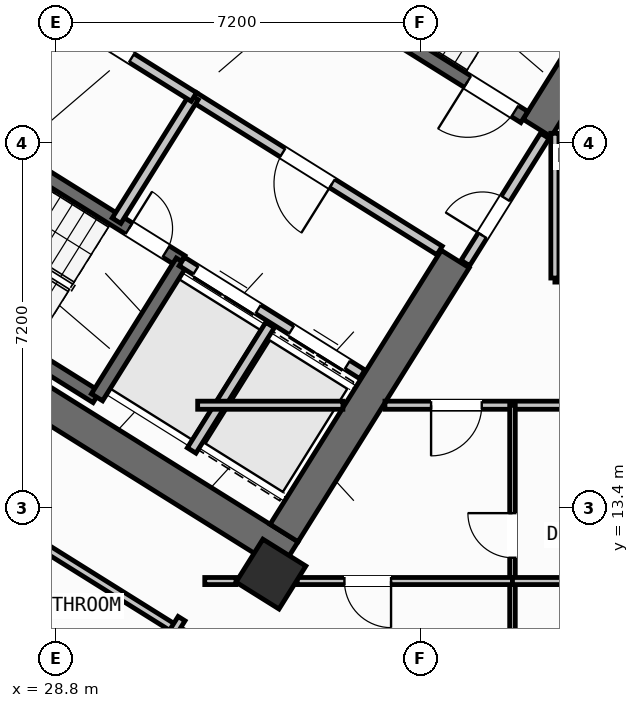
"""IFC4 building model, lengths in metres.
Left out: names, types, materials, properties, quantities, classifications, styles, units other than length and angle.
Written with IfcOpenShell. Run it as: python <this file> out.ifc"""

import sys

from ifc_helpers import new_model, si_unit, direction, frame, frame_2d, origin, origin_2d, place, context, subcontext, project, spatial, rectangle, hollow_rectangle, extrude, source, transform, mapped, element, fill, save


model = new_model("IFC4")
c1 = context("Model", 3, precision=1e-05, world=origin(), true_north=direction((0.0, 1.0)))
c2 = subcontext(c1, "Body", "Model", "MODEL_VIEW")
j1 = project(units=[si_unit("LENGTHUNIT", "METRE"), si_unit("PLANEANGLEUNIT", "RADIAN")], contexts=[c1])
p1 = place(None, origin())
s1 = spatial("IfcSite", under=j1, at=p1, CompositionType="ELEMENT")
p2 = place(p1, origin())
s2 = spatial("IfcBuilding", under=s1, at=p2, CompositionType="ELEMENT")
p3 = place(p2, frame((0.0, 0.0, 60.0)))
s3 = spatial("IfcBuildingStorey", under=s2, at=p3, CompositionType="ELEMENT", Elevation=60.0)
p4 = place(p3, frame((33.409, 12.45, 0.0), z_axis=(0.0, 0.0, 1.0), x_axis=(-0.848051132073, 0.529914405721, 0.0)))
e1 = element("IfcWall", 1, at=p4, inside=s3, PredefinedType="SHEAR", context=c2, shape_type="SweptSolid", body=[
    extrude(rectangle(XDim=13.24, YDim=0.65, at=frame_2d((6.62, 0.0))), origin(), (0.0, 0.0, 1.0), 3.35),
])
p5 = place(p3, frame((40.168, 23.88, 0.0), z_axis=(0.0, 0.0, 1.0), x_axis=(-0.529893103397, -0.8480644427, 0.0)))
e2 = element("IfcWall", 2, at=p5, inside=s3, PredefinedType="SHEAR", context=c2, shape_type="SweptSolid", body=[
    extrude(rectangle(XDim=3.525, YDim=0.65, at=frame_2d((1.763, 0.0))), origin(), (0.0, 0.0, 1.0), 3.35),
])
p6 = place(p3, frame((36.683, 18.304, 0.0), z_axis=(0.0, 0.0, 1.0), x_axis=(-0.529899109053, -0.848060690178, 0.0)))
e3 = element("IfcWall", 3, at=p6, inside=s3, PredefinedType="SHEAR", context=c2, shape_type="SweptSolid", body=[
    extrude(rectangle(XDim=6.375, YDim=0.65, at=frame_2d((3.188, 0.0))), origin(), (0.0, 0.0, 1.0), 3.35),
])
m1 = source(origin(), c2, "Body", "SweptSolid", [
    extrude(hollow_rectangle(XDim=1.0, YDim=1.0, WallThickness=0.04, at=origin_2d()), origin(), (0.0, 0.0, 1.0), 3.6),
])
p7 = place(p3, frame((33.046, 12.087, 0.0), z_axis=(0.0, 0.0, 1.0), x_axis=(-0.848048096156, 0.529919264233, 0.0)))
e4 = element("IfcColumn", 4, at=p7, inside=s3, PredefinedType="COLUMN", context=c2, shape_type="MappedRepresentation", body=[
    mapped(m1, transform((0.0, 0.0, 0.0), scale=1.0)),
])
p8 = place(p3, frame((29.268, 6.429, 0.0), z_axis=(0.0, 0.0, 1.0), x_axis=(-0.848049971435, 0.529916263149, 0.0)))
e5 = element("IfcWall", 5, at=p8, inside=s3, PredefinedType="STANDARD", context=c2, shape_type="SweptSolid", body=[
    extrude(rectangle(XDim=31.588, YDim=0.32, at=frame_2d((15.794, 0.0))), origin(), (0.0, 0.0, 1.0), 3.35),
])
p9 = place(p8, frame((16.235, 0.0, 0.0)))
e6 = element("IfcOpeningElement", 6, at=p9, cuts=e5, PredefinedType="OPENING", context=c2, shape_type="SweptSolid", body=[
    extrude(rectangle(XDim=1.2, YDim=2.15, at=frame_2d((0.6, 1.075))), frame((0.0, 0.17, 0.0), z_axis=(0.0, -1.0, 0.0), x_axis=(1.0, 0.0, 0.0)), (0.0, 0.0, 1.0), 0.34),
])
p10 = place(p8, frame((2.989, 0.0, 0.8)))
e7 = element("IfcOpeningElement", 7, at=p10, cuts=e5, PredefinedType="OPENING", context=c2, shape_type="SweptSolid", body=[
    extrude(rectangle(XDim=2.1, YDim=1.55, at=frame_2d((1.05, 0.775))), frame((0.0, 0.17, 0.0), z_axis=(0.0, -1.0, 0.0), x_axis=(1.0, 0.0, 0.0)), (0.0, 0.0, 1.0), 0.34),
])
p11 = place(p8, frame((8.359, 0.0, 0.8)))
e8 = element("IfcOpeningElement", 8, at=p11, cuts=e5, PredefinedType="OPENING", context=c2, shape_type="SweptSolid", body=[
    extrude(rectangle(XDim=2.1, YDim=1.55, at=frame_2d((1.05, 0.775))), frame((0.0, 0.17, 0.0), z_axis=(0.0, -1.0, 0.0), x_axis=(1.0, 0.0, 0.0)), (0.0, 0.0, 1.0), 0.34),
])
p12 = place(p8, frame((13.284, 0.0, 0.95)))
e9 = element("IfcOpeningElement", 9, at=p12, cuts=e5, PredefinedType="OPENING", context=c2, shape_type="SweptSolid", body=[
    extrude(rectangle(XDim=1.2, YDim=1.4, at=frame_2d((0.6, 0.7))), frame((0.0, 0.17, 0.0), z_axis=(0.0, -1.0, 0.0), x_axis=(1.0, 0.0, 0.0)), (0.0, 0.0, 1.0), 0.34),
])
p13 = place(p8, frame((22.374, 0.0, 0.95)))
e10 = element("IfcOpeningElement", 10, at=p13, cuts=e5, PredefinedType="OPENING", context=c2, shape_type="SweptSolid", body=[
    extrude(rectangle(XDim=1.2, YDim=1.4, at=frame_2d((0.6, 0.7))), frame((0.0, 0.17, 0.0), z_axis=(0.0, -1.0, 0.0), x_axis=(1.0, 0.0, 0.0)), (0.0, 0.0, 1.0), 0.34),
])
p14 = place(p8, frame((26.351, 0.0, 1.0)))
e11 = element("IfcOpeningElement", 11, at=p14, cuts=e5, PredefinedType="OPENING", context=c2, shape_type="SweptSolid", body=[
    extrude(rectangle(XDim=0.9, YDim=1.25, at=frame_2d((0.45, 0.625))), frame((0.0, 0.17, 0.0), z_axis=(0.0, -1.0, 0.0), x_axis=(1.0, 0.0, 0.0)), (0.0, 0.0, 1.0), 0.34),
])
p15 = place(p8, frame((29.052, 0.0, 0.85)))
e12 = element("IfcOpeningElement", 12, at=p15, cuts=e5, PredefinedType="OPENING", context=c2, shape_type="SweptSolid", body=[
    extrude(rectangle(XDim=1.8, YDim=1.5, at=frame_2d((0.9, 0.75))), frame((0.0, 0.17, 0.0), z_axis=(0.0, -1.0, 0.0), x_axis=(1.0, 0.0, 0.0)), (0.0, 0.0, 1.0), 0.34),
])
p16 = place(p3, frame((29.605, 15.581, 0.0), z_axis=(0.0, 0.0, 1.0), x_axis=(-0.848036911448, 0.529937163087, 0.0)))
e13 = element("IfcWall", 13, at=p16, inside=s3, PredefinedType="SHEAR", context=c2, shape_type="SweptSolid", body=[
    extrude(rectangle(XDim=7.46, YDim=0.26, at=frame_2d((3.73, 0.0))), origin(), (0.0, 0.0, 1.0), 3.35),
])
p17 = place(p3, frame((31.28, 18.261, 0.0), z_axis=(0.0, 0.0, 1.0), x_axis=(-0.848051618787, 0.529913626805, 0.0)))
e14 = element("IfcWall", 14, at=p17, inside=s3, PredefinedType="SHEAR", context=c2, shape_type="SweptSolid", body=[
    extrude(rectangle(XDim=7.46, YDim=0.26, at=frame_2d((3.73, 0.0))), origin(), (0.0, 0.0, 1.0), 3.35),
])
p18 = place(p17, frame((0.36, 0.0, 0.0)))
e15 = element("IfcOpeningElement", 15, at=p18, cuts=e14, PredefinedType="OPENING", context=c2, shape_type="SweptSolid", body=[
    extrude(rectangle(XDim=0.86, YDim=2.05, at=frame_2d((0.43, 1.025))), frame((0.0, 0.14, 0.0), z_axis=(0.0, -1.0, 0.0), x_axis=(1.0, 0.0, 0.0)), (0.0, 0.0, 1.0), 0.28),
])
p19 = place(p3, frame((31.288, 18.256, 0.0), z_axis=(0.0, 0.0, 1.0), x_axis=(-0.529943379326, -0.848033026897, 0.0)))
e16 = element("IfcWall", 16, at=p19, inside=s3, PredefinedType="SHEAR", context=c2, shape_type="SweptSolid", body=[
    extrude(rectangle(XDim=3.16, YDim=0.26, at=frame_2d((1.58, 0.0))), origin(), (0.0, 0.0, 1.0), 3.35),
])
p20 = place(p3, frame((38.046, 21.108, 0.0), z_axis=(0.0, 0.0, 1.0), x_axis=(-0.848054434086, 0.529909121291, 0.0)))
e17 = element("IfcWall", 17, at=p20, inside=s3, PredefinedType="SHEAR", context=c2, shape_type="SweptSolid", body=[
    extrude(rectangle(XDim=7.33, YDim=0.26, at=frame_2d((3.665, 0.0))), origin(), (0.0, 0.0, 1.0), 3.35),
])
p21 = place(p20, frame((0.22, 0.0, 0.0)))
e18 = element("IfcOpeningElement", 18, at=p21, cuts=e17, PredefinedType="OPENING", context=c2, shape_type="SweptSolid", body=[
    extrude(rectangle(XDim=1.1, YDim=2.1, at=frame_2d((0.55, 1.05))), frame((0.0, 0.14, 0.0), z_axis=(0.0, -1.0, 0.0), x_axis=(1.0, 0.0, 0.0)), (0.0, 0.0, 1.0), 0.28),
])
p22 = place(p3, frame((34.848, 16.031, 0.0), z_axis=(0.0, 0.0, 1.0), x_axis=(-0.848044042236, 0.529925751807, 0.0)))
e19 = element("IfcWall", 19, at=p22, inside=s3, PredefinedType="STANDARD", context=c2, shape_type="SweptSolid", body=[
    extrude(rectangle(XDim=4.198, YDim=0.2, at=frame_2d((2.099, 0.0))), origin(), (0.0, 0.0, 1.0), 3.34),
])
p23 = place(p22, frame((0.348, 0.0, 0.0)))
e20 = element("IfcOpeningElement", 20, at=p23, cuts=e19, PredefinedType="OPENING", context=c2, shape_type="SweptSolid", body=[
    extrude(rectangle(XDim=1.3, YDim=2.2, at=frame_2d((0.65, 1.1))), frame((0.0, 0.11, 0.0), z_axis=(0.0, -1.0, 0.0), x_axis=(1.0, 0.0, 0.0)), (0.0, 0.0, 1.0), 0.22),
])
p24 = place(p22, frame((2.423, 0.0, 0.0)))
e21 = element("IfcOpeningElement", 21, at=p24, cuts=e19, PredefinedType="OPENING", context=c2, shape_type="SweptSolid", body=[
    extrude(rectangle(XDim=1.45, YDim=2.25, at=frame_2d((0.725, 1.125))), frame((0.0, 0.11, 0.0), z_axis=(0.0, -1.0, 0.0), x_axis=(1.0, 0.0, 0.0)), (0.0, 0.0, 1.0), 0.22),
])
p25 = place(p3, frame((36.374, 18.474, 0.0), z_axis=(0.0, 0.0, 1.0), x_axis=(-0.848051071577, 0.529914502535, 0.0)))
e22 = element("IfcWall", 22, at=p25, inside=s3, PredefinedType="STANDARD", context=c2, shape_type="SweptSolid", body=[
    extrude(rectangle(XDim=5.718, YDim=0.2, at=frame_2d((2.859, 0.0))), origin(), (0.0, 0.0, 1.0), 3.34),
])
p26 = place(p25, frame((2.498, 0.0, 0.0)))
e23 = element("IfcOpeningElement", 23, at=p26, cuts=e22, PredefinedType="OPENING", context=c2, shape_type="SweptSolid", body=[
    extrude(rectangle(XDim=1.15, YDim=2.1, at=frame_2d((0.575, 1.05))), frame((0.0, 0.11, 0.0), z_axis=(0.0, -1.0, 0.0), x_axis=(1.0, 0.0, 0.0)), (0.0, 0.0, 1.0), 0.22),
])
p27 = place(p3, frame((33.029, 17.003, 0.0), z_axis=(0.0, 0.0, 1.0), x_axis=(-0.529916267533, -0.848049968695, 0.0)))
e24 = element("IfcWall", 24, at=p27, inside=s3, PredefinedType="STANDARD", context=c2, shape_type="SweptSolid", body=[
    extrude(rectangle(XDim=2.92, YDim=0.2, at=frame_2d((1.46, 0.0))), origin(), (0.0, 0.0, 1.0), 3.34),
])
for number, where, z_axis, x_axis in (
    (25, (31.525, 21.504, 0.0), (0.0, 0.0, 1.0), (-0.53, -0.848, 0.0)),
    (26, (28.71, 23.263, 0.0), (0.0, 0.0, 1.0), (-0.53, -0.848, 0.0)),
):
    element("IfcWall", number, at=place(p3, frame(where, z_axis=z_axis, x_axis=x_axis)), inside=s3, PredefinedType="STANDARD", context=c2, shape_type="SweptSolid", body=[
        extrude(rectangle(XDim=2.88, YDim=0.2, at=frame_2d((1.44, 0.0))), origin(), (0.0, 0.0, 1.0), 3.34),
    ])
p28 = place(p3, frame((31.525, 21.504, 0.0), z_axis=(0.0, 0.0, 1.0), x_axis=(-0.848044998614, 0.529924221305, 0.0)))
e27 = element("IfcWall", 27, at=p28, inside=s3, PredefinedType="STANDARD", context=c2, shape_type="SweptSolid", body=[
    extrude(rectangle(XDim=6.168, YDim=0.2, at=frame_2d((3.084, 0.0))), origin(), (0.0, 0.0, 1.0), 3.34),
])
p29 = place(p28, frame((4.4, 0.0, 0.0)))
e28 = element("IfcOpeningElement", 28, at=p29, cuts=e27, PredefinedType="OPENING", context=c2, shape_type="SweptSolid", body=[
    extrude(rectangle(XDim=0.86, YDim=2.05, at=frame_2d((0.43, 1.025))), frame((0.0, 0.11, 0.0), z_axis=(0.0, -1.0, 0.0), x_axis=(1.0, 0.0, 0.0)), (0.0, 0.0, 1.0), 0.22),
])
p30 = place(p28, frame((1.45, 0.0, 0.0)))
e29 = element("IfcOpeningElement", 29, at=p30, cuts=e27, PredefinedType="OPENING", context=c2, shape_type="SweptSolid", body=[
    extrude(rectangle(XDim=0.86, YDim=2.05, at=frame_2d((0.43, 1.025))), frame((0.0, 0.11, 0.0), z_axis=(0.0, -1.0, 0.0), x_axis=(1.0, 0.0, 0.0)), (0.0, 0.0, 1.0), 0.22),
])
p31 = place(p3, frame((32.164, 10.374, 0.0), z_axis=(0.0, 0.0, 1.0), x_axis=(-0.848044107957, 0.529925646633, 0.0)))
e30 = element("IfcWall", 30, at=p31, inside=s3, PredefinedType="PARTITIONING", context=c2, shape_type="SweptSolid", body=[
    extrude(rectangle(XDim=15.57, YDim=0.16, at=frame_2d((7.785, 0.0))), origin(), (0.0, 0.0, 1.0), 3.34),
])
p32 = place(p31, frame((10.83, 0.0, 0.0)))
e31 = element("IfcOpeningElement", 31, at=p32, cuts=e30, PredefinedType="OPENING", context=c2, shape_type="SweptSolid", body=[
    extrude(rectangle(XDim=1.0, YDim=2.1, at=frame_2d((0.5, 1.05))), frame((0.0, 0.09, 0.0), z_axis=(0.0, -1.0, 0.0), x_axis=(1.0, 0.0, 0.0)), (0.0, 0.0, 1.0), 0.18),
])
p33 = place(p3, frame((31.282, 11.208, 0.0), z_axis=(0.0, 0.0, 1.0), x_axis=(-0.529938869374, -0.84803584519, 0.0)))
e32 = element("IfcWall", 32, at=p33, inside=s3, PredefinedType="PARTITIONING", context=c2, shape_type="SweptSolid", body=[
    extrude(rectangle(XDim=5.48, YDim=0.16, at=frame_2d((2.74, 0.0))), origin(), (0.0, 0.0, 1.0), 3.34),
])
p34 = place(p3, frame((29.72, 8.859, 0.0), z_axis=(0.0, 0.0, 1.0), x_axis=(-0.848049134363, 0.529917602752, 0.0)))
e33 = element("IfcWall", 33, at=p34, inside=s3, PredefinedType="PLUMBINGWALL", context=c2, shape_type="SweptSolid", body=[
    extrude(rectangle(XDim=14.3, YDim=0.14, at=frame_2d((7.15, 0.0))), origin(), (0.0, 0.0, 1.0), 3.34),
])
p35 = place(p34, frame((9.57, 0.0, 0.0)))
e34 = element("IfcOpeningElement", 34, at=p35, cuts=e33, PredefinedType="OPENING", context=c2, shape_type="SweptSolid", body=[
    extrude(rectangle(XDim=0.92, YDim=2.08, at=frame_2d((0.46, 1.04))), frame((0.0, 0.08, 0.0), z_axis=(0.0, -1.0, 0.0), x_axis=(1.0, 0.0, 0.0)), (0.0, 0.0, 1.0), 0.16),
])
p36 = place(p3, frame((38.451, 20.737, 0.0), z_axis=(0.0, 0.0, 1.0), x_axis=(-0.529924799939, -0.848044637038, 0.0)))
e35 = element("IfcWall", 35, at=p36, inside=s3, PredefinedType="STANDARD", context=c2, shape_type="SweptSolid", body=[
    extrude(rectangle(XDim=2.96, YDim=0.2, at=frame_2d((1.48, 0.0))), origin(), (0.0, 0.0, 1.0), 3.34),
])
p37 = place(p36, frame((1.46, 0.0, 0.0)))
e36 = element("IfcOpeningElement", 36, at=p37, cuts=e35, PredefinedType="OPENING", context=c2, shape_type="SweptSolid", body=[
    extrude(rectangle(XDim=0.86, YDim=2.05, at=frame_2d((0.43, 1.025))), frame((0.0, 0.11, 0.0), z_axis=(0.0, -1.0, 0.0), x_axis=(1.0, 0.0, 0.0)), (0.0, 0.0, 1.0), 0.22),
])
p38 = place(p3, frame((31.6, 15.42, 0.0), z_axis=(0.0, 0.0, 1.0), x_axis=(1.0, 0.0, 0.0)))
e37 = element("IfcWall", 37, at=p38, inside=s3, PredefinedType="PARTITIONING", context=c2, shape_type="SweptSolid", body=[
    extrude(rectangle(XDim=2.866, YDim=0.16, at=frame_2d((1.433, 0.0))), origin(), (0.0, 0.0, 1.0), 3.34),
])
p39 = place(p3, frame((35.296, 15.42, 0.0), z_axis=(0.0, 0.0, 1.0), x_axis=(1.0, 0.0, 0.0)))
e38 = element("IfcWall", 38, at=p39, inside=s3, PredefinedType="PARTITIONING", context=c2, shape_type="SweptSolid", body=[
    extrude(rectangle(XDim=15.311, YDim=0.16, at=frame_2d((7.655, 0.0))), origin(), (0.0, 0.0, 1.0), 3.34),
])
p40 = place(p39, frame((0.91, 0.0, 0.0)))
e39 = element("IfcOpeningElement", 39, at=p40, cuts=e38, PredefinedType="OPENING", context=c2, shape_type="SweptSolid", body=[
    extrude(rectangle(XDim=1.0, YDim=2.1, at=frame_2d((0.5, 1.05))), frame((0.0, 0.09, 0.0), z_axis=(0.0, -1.0, 0.0), x_axis=(1.0, 0.0, 0.0)), (0.0, 0.0, 1.0), 0.18),
])
p41 = place(p39, frame((8.74, 0.0, 0.0)))
e40 = element("IfcOpeningElement", 40, at=p41, cuts=e38, PredefinedType="OPENING", context=c2, shape_type="SweptSolid", body=[
    extrude(rectangle(XDim=1.0, YDim=2.1, at=frame_2d((0.5, 1.05))), frame((0.0, 0.09, 0.0), z_axis=(0.0, -1.0, 0.0), x_axis=(1.0, 0.0, 0.0)), (0.0, 0.0, 1.0), 0.18),
])
p42 = place(p3, frame((38.65, 17.93, 0.0), z_axis=(0.0, 0.0, 1.0), x_axis=(1.0, 0.0, 0.0)))
e41 = element("IfcWall", 41, at=p42, inside=s3, PredefinedType="PARTITIONING", context=c2, shape_type="SweptSolid", body=[
    extrude(rectangle(XDim=9.95, YDim=0.16, at=frame_2d((4.975, 0.0))), origin(), (0.0, 0.0, 1.0), 3.34),
])
p43 = place(p42, frame((4.475, 0.0, 0.0)))
e42 = element("IfcOpeningElement", 42, at=p43, cuts=e41, PredefinedType="OPENING", context=c2, shape_type="SweptSolid", body=[
    extrude(rectangle(XDim=1.0, YDim=2.1, at=frame_2d((0.5, 1.05))), frame((0.0, 0.09, 0.0), z_axis=(0.0, -1.0, 0.0), x_axis=(1.0, 0.0, 0.0)), (0.0, 0.0, 1.0), 0.18),
])
p44 = place(p3, frame((38.65, 17.93, 0.0), z_axis=(0.0, 0.0, 1.0), x_axis=(0.0, 1.0, 0.0)))
e43 = element("IfcWall", 43, at=p44, inside=s3, PredefinedType="PARTITIONING", context=c2, shape_type="SweptSolid", body=[
    extrude(rectangle(XDim=2.857, YDim=0.16, at=frame_2d((1.428, 0.0))), origin(), (0.0, 0.0, 1.0), 3.34),
])
p45 = place(p3, frame((37.813, 1.96, 0.0), z_axis=(0.0, 0.0, 1.0), x_axis=(0.0, 1.0, 0.0)))
e44 = element("IfcWall", 44, at=p45, inside=s3, PredefinedType="PARTITIONING", context=c2, shape_type="SweptSolid", body=[
    extrude(rectangle(XDim=13.46, YDim=0.11, at=frame_2d((6.73, 0.0))), origin(), (0.0, 0.0, 1.0), 3.34),
])
p46 = place(p45, frame((5.5, 0.0, 0.0)))
e45 = element("IfcOpeningElement", 45, at=p46, cuts=e44, PredefinedType="OPENING", context=c2, shape_type="SweptSolid", body=[
    extrude(rectangle(XDim=0.92, YDim=2.08, at=frame_2d((0.46, 1.04))), frame((0.0, 0.065, 0.0), z_axis=(0.0, -1.0, 0.0), x_axis=(1.0, 0.0, 0.0)), (0.0, 0.0, 1.0), 0.13),
])
p47 = place(p45, frame((10.45, 0.0, 0.0)))
e46 = element("IfcOpeningElement", 46, at=p47, cuts=e44, PredefinedType="OPENING", context=c2, shape_type="SweptSolid", body=[
    extrude(rectangle(XDim=0.88, YDim=2.08, at=frame_2d((0.44, 1.04))), frame((0.0, 0.065, 0.0), z_axis=(0.0, -1.0, 0.0), x_axis=(1.0, 0.0, 0.0)), (0.0, 0.0, 1.0), 0.13),
])
p48 = place(p3, frame((31.74, 11.95, 0.0), z_axis=(0.0, 0.0, 1.0), x_axis=(1.0, 0.0, 0.0)))
e47 = element("IfcWall", 47, at=p48, inside=s3, PredefinedType="PLUMBINGWALL", context=c2, shape_type="SweptSolid", body=[
    extrude(rectangle(XDim=0.617, YDim=0.14, at=frame_2d((0.309, 0.0))), origin(), (0.0, 0.0, 1.0), 3.34),
])
p49 = place(p3, frame((33.564, 11.95, 0.0), z_axis=(0.0, 0.0, 1.0), x_axis=(1.0, 0.0, 0.0)))
e48 = element("IfcWall", 48, at=p49, inside=s3, PredefinedType="PLUMBINGWALL", context=c2, shape_type="SweptSolid", body=[
    extrude(rectangle(XDim=4.249, YDim=0.14, at=frame_2d((2.124, 0.0))), origin(), (0.0, 0.0, 1.0), 2.525),
])
p50 = place(p49, frame((0.932, 0.0, 0.0)))
e49 = element("IfcOpeningElement", 49, at=p50, cuts=e48, PredefinedType="OPENING", context=c2, shape_type="SweptSolid", body=[
    extrude(rectangle(XDim=0.92, YDim=2.08, at=frame_2d((0.46, 1.04))), frame((0.0, 0.08, 0.0), z_axis=(0.0, -1.0, 0.0), x_axis=(1.0, 0.0, 0.0)), (0.0, 0.0, 1.0), 0.16),
])
p51 = place(p3, frame((37.813, 11.95, 0.0), z_axis=(0.0, 0.0, 1.0), x_axis=(1.0, 0.0, 0.0)))
e50 = element("IfcWall", 50, at=p51, inside=s3, PredefinedType="PLUMBINGWALL", context=c2, shape_type="SweptSolid", body=[
    extrude(rectangle(XDim=4.137, YDim=0.14, at=frame_2d((2.068, 0.0))), origin(), (0.0, 0.0, 1.0), 2.525),
])
m2 = source(origin(), c2, "Body", "SweptSolid", [
    extrude(rectangle(XDim=0.86, YDim=2.05, at=frame_2d((0.43, 1.025))), frame((0.0, 0.025, 0.0), z_axis=(0.0, -1.0, 0.0), x_axis=(1.0, 0.0, 0.0)), (0.0, 0.0, 1.0), 0.05),
])
p52 = place(p18, frame((0.86, 0.0, 0.0), z_axis=(0.0, 0.0, 1.0), x_axis=(-1.0, 0.0, 0.0)))
e51 = element("IfcDoor", 51, at=p52, inside=s3, OperationType="SINGLE_SWING_LEFT", PredefinedType="DOOR", context=c2, shape_type="MappedRepresentation", body=[
    mapped(m2, transform((0.0, 0.0, 0.0), scale=1.0)),
])
fill(e15, e51)
m3 = source(origin(), c2, "Body", "SweptSolid", [
    extrude(rectangle(XDim=1.1, YDim=2.1, at=frame_2d((0.55, 1.05))), frame((0.0, 0.025, 0.0), z_axis=(0.0, -1.0, 0.0), x_axis=(1.0, 0.0, 0.0)), (0.0, 0.0, 1.0), 0.05),
])
p53 = place(p21, origin())
e52 = element("IfcDoor", 52, at=p53, inside=s3, OperationType="SINGLE_SWING_RIGHT", PredefinedType="DOOR", context=c2, shape_type="MappedRepresentation", body=[
    mapped(m3, transform((0.0, 0.0, 0.0), scale=1.0)),
])
fill(e18, e52)
m4 = source(origin(), c2, "Body", "SweptSolid", [
    extrude(rectangle(XDim=1.15, YDim=2.1, at=frame_2d((0.575, 1.05))), frame((0.0, 0.025, 0.0), z_axis=(0.0, -1.0, 0.0), x_axis=(1.0, 0.0, 0.0)), (0.0, 0.0, 1.0), 0.05),
])
p54 = place(p26, origin())
e53 = element("IfcDoor", 53, at=p54, inside=s3, OperationType="SINGLE_SWING_LEFT", PredefinedType="DOOR", context=c2, shape_type="MappedRepresentation", body=[
    mapped(m4, transform((0.0, 0.0, 0.0), scale=1.0)),
])
fill(e23, e53)
m5 = source(origin(), c2, "Body", "SweptSolid", [
    extrude(rectangle(XDim=1.3, YDim=2.2, at=frame_2d((0.65, 1.1))), frame((0.0, 0.025, 0.0), z_axis=(0.0, -1.0, 0.0), x_axis=(1.0, 0.0, 0.0)), (0.0, 0.0, 1.0), 0.05),
])
p55 = place(p23, origin())
e54 = element("IfcDoor", 54, at=p55, inside=s3, OperationType="DOUBLE_DOOR_SLIDING", PredefinedType="DOOR", context=c2, shape_type="MappedRepresentation", body=[
    mapped(m5, transform((0.0, 0.0, 0.0), scale=1.0)),
])
fill(e20, e54)
m6 = source(origin(), c2, "Body", "SweptSolid", [
    extrude(rectangle(XDim=1.45, YDim=2.25, at=frame_2d((0.725, 1.125))), frame((0.0, 0.025, 0.0), z_axis=(0.0, -1.0, 0.0), x_axis=(1.0, 0.0, 0.0)), (0.0, 0.0, 1.0), 0.05),
])
p56 = place(p24, origin())
e55 = element("IfcDoor", 55, at=p56, inside=s3, OperationType="DOUBLE_DOOR_SLIDING", PredefinedType="DOOR", context=c2, shape_type="MappedRepresentation", body=[
    mapped(m6, transform((0.0, 0.0, 0.0), scale=1.0)),
])
fill(e21, e55)
p57 = place(p30, frame((0.86, 0.0, 0.0), z_axis=(0.0, 0.0, 1.0), x_axis=(-1.0, 0.0, 0.0)))
e56 = element("IfcDoor", 56, at=p57, inside=s3, OperationType="SINGLE_SWING_LEFT", PredefinedType="DOOR", context=c2, shape_type="MappedRepresentation", body=[
    mapped(m2, transform((0.0, 0.0, 0.0), scale=1.0)),
])
fill(e29, e56)
p58 = place(p37, frame((0.86, 0.0, 0.0), z_axis=(0.0, 0.0, 1.0), x_axis=(-1.0, 0.0, 0.0)))
e57 = element("IfcDoor", 57, at=p58, inside=s3, OperationType="SINGLE_SWING_LEFT", PredefinedType="DOOR", context=c2, shape_type="MappedRepresentation", body=[
    mapped(m2, transform((0.0, 0.0, 0.0), scale=1.0)),
])
fill(e36, e57)
m7 = source(origin(), c2, "Body", "SweptSolid", [
    extrude(rectangle(XDim=1.0, YDim=2.1, at=frame_2d((0.5, 1.05))), frame((0.0, 0.025, 0.0), z_axis=(0.0, -1.0, 0.0), x_axis=(1.0, 0.0, 0.0)), (0.0, 0.0, 1.0), 0.05),
])
p59 = place(p40, frame((1.0, 0.0, 0.0), z_axis=(0.0, 0.0, 1.0), x_axis=(-1.0, 0.0, 0.0)))
e58 = element("IfcDoor", 58, at=p59, inside=s3, OperationType="SINGLE_SWING_RIGHT", PredefinedType="DOOR", context=c2, shape_type="MappedRepresentation", body=[
    mapped(m7, transform((0.0, 0.0, 0.0), scale=1.0)),
])
fill(e39, e58)
m8 = source(origin(), c2, "Body", "SweptSolid", [
    extrude(rectangle(XDim=0.92, YDim=2.08, at=frame_2d((0.46, 1.04))), frame((0.0, 0.025, 0.0), z_axis=(0.0, -1.0, 0.0), x_axis=(1.0, 0.0, 0.0)), (0.0, 0.0, 1.0), 0.05),
])
p60 = place(p50, frame((0.92, 0.0, 0.0), z_axis=(0.0, 0.0, 1.0), x_axis=(-1.0, 0.0, 0.0)))
e59 = element("IfcDoor", 59, at=p60, inside=s3, OperationType="SINGLE_SWING_LEFT", PredefinedType="DOOR", context=c2, shape_type="MappedRepresentation", body=[
    mapped(m8, transform((0.0, 0.0, 0.0), scale=1.0)),
])
fill(e49, e59)
m9 = source(origin(), c2, "Body", "SweptSolid", [
    extrude(rectangle(XDim=0.88, YDim=2.08, at=frame_2d((0.44, 1.04))), frame((0.0, 0.025, 0.0), z_axis=(0.0, -1.0, 0.0), x_axis=(1.0, 0.0, 0.0)), (0.0, 0.0, 1.0), 0.05),
])
p61 = place(p47, origin())
e60 = element("IfcDoor", 60, at=p61, inside=s3, OperationType="SINGLE_SWING_RIGHT", PredefinedType="DOOR", context=c2, shape_type="MappedRepresentation", body=[
    mapped(m9, transform((0.0, 0.0, 0.0), scale=1.0)),
])
fill(e46, e60)
save(model, sys.argv[1])
